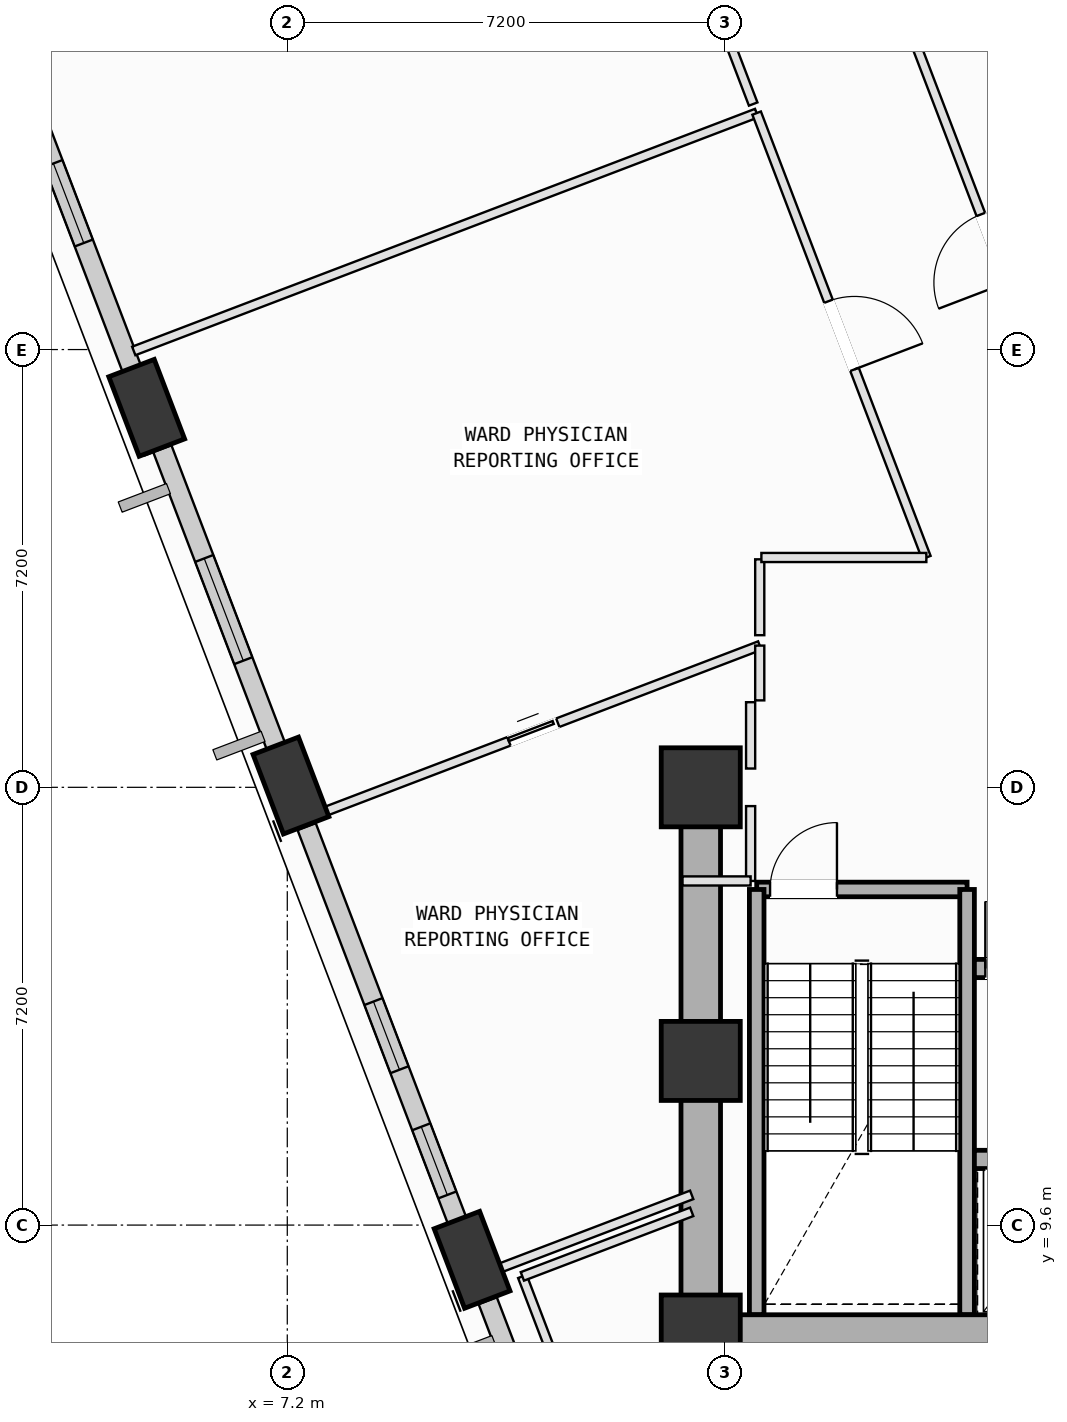
"""IFC4 building model, lengths in metres.
Left out: names, types, materials, properties, quantities, classifications, styles, units other than length and angle.
Written with IfcOpenShell. Run it as: python <this file> out.ifc"""

import sys

from ifc_helpers import new_model, si_unit, direction, frame, frame_2d, origin, origin_2d, place, context, subcontext, project, spatial, rectangle, extrude, element, fill, save


model = new_model("IFC4")
c1 = context("Model", 3, precision=1e-05, world=origin(), true_north=direction((0.0, 1.0)))
c2 = subcontext(c1, "Body", "Model", "MODEL_VIEW")
j1 = project(units=[si_unit("LENGTHUNIT", "METRE"), si_unit("PLANEANGLEUNIT", "RADIAN")], contexts=[c1])
p1 = place(None, origin())
s1 = spatial("IfcSite", under=j1, at=p1, CompositionType="ELEMENT")
p2 = place(p1, origin())
s2 = spatial("IfcBuilding", under=s1, at=p2, CompositionType="ELEMENT")
p3 = place(p2, frame((0.0, 0.0, 112.4)))
s3 = spatial("IfcBuildingStorey", under=s2, at=p3, CompositionType="ELEMENT", Elevation=112.4)
for number, where, z_axis, x_axis in (
    (1, (14.0, 7.8, 0.0), (0.0, 0.0, 1.0), (1.0, 0.0, 0.0)),
    (2, (14.0, 12.3, 0.0), (0.0, 0.0, 1.0), (1.0, 0.0, 0.0)),
    (3, (14.0, 16.8, 0.0), (0.0, 0.0, 1.0), (1.0, 0.0, 0.0)),
):
    element("IfcColumn", number, at=place(p3, frame(where, z_axis=z_axis, x_axis=x_axis)), inside=s3, PredefinedType="COLUMN", context=c2, shape_type="SweptSolid", body=[
        extrude(rectangle(XDim=1.3, YDim=1.3, at=origin_2d()), origin(), (0.0, 0.0, 1.0), 4.0),
    ])
p4 = place(p3, frame((4.888, 23.042, 0.002), z_axis=(0.008189293553, -0.118107811468, 0.992967008687), x_axis=(-0.420049262913, 0.900736291816, 0.110601760074)))
e4 = element("IfcColumn", 4, at=p4, inside=s3, PredefinedType="COLUMN", context=c2, shape_type="SweptSolid", body=[
    extrude(rectangle(XDim=1.4, YDim=0.8, at=origin_2d()), origin(), (0.0, 0.0, 1.0), 4.025),
])
p5 = place(p3, frame((7.26, 16.829, 0.002), z_axis=(0.033747682875, -0.108223234831, 0.99355363486), x_axis=(-0.616879645364, 0.77989986195, 0.105904241962)))
e5 = element("IfcColumn", 5, at=p5, inside=s3, PredefinedType="COLUMN", context=c2, shape_type="SweptSolid", body=[
    extrude(rectangle(XDim=1.4, YDim=0.8, at=origin_2d()), origin(), (0.0, 0.0, 1.0), 4.022),
])
p6 = place(p3, frame((10.239, 9.029, 0.002), z_axis=(0.065774792344, -0.095688973733, 0.993235771103), x_axis=(-0.819595414556, 0.562580206894, 0.108475191866)))
e6 = element("IfcColumn", 6, at=p6, inside=s3, PredefinedType="COLUMN", context=c2, shape_type="SweptSolid", body=[
    extrude(rectangle(XDim=1.4, YDim=0.8, at=origin_2d()), origin(), (0.0, 0.0, 1.0), 4.023),
])
p7 = place(p3, frame((4.794, 23.288, 0.0), z_axis=(0.0, 0.0, 1.0), x_axis=(-0.356736674648, 0.934204980163, 0.0)))
e7 = element("IfcWall", 7, at=p7, inside=s3, PredefinedType="SOLIDWALL", context=c2, shape_type="SweptSolid", body=[
    extrude(rectangle(XDim=5.628, YDim=0.32, at=frame_2d((2.814, 0.0))), origin(), (0.0, 0.0, 1.0), 3.165),
])
p8 = place(p7, frame((2.638, 0.0, 0.75)))
e8 = element("IfcOpeningElement", 8, at=p8, cuts=e7, PredefinedType="OPENING", context=c2, shape_type="SweptSolid", body=[
    extrude(rectangle(XDim=1.4, YDim=1.85, at=frame_2d((0.7, 0.925))), frame((0.0, 0.17, 0.0), z_axis=(0.0, -1.0, 0.0), x_axis=(1.0, 0.0, 0.0)), (0.0, 0.0, 1.0), 0.34),
])
p9 = place(p3, frame((7.165, 17.08, 0.0), z_axis=(0.0, 0.0, 1.0), x_axis=(-0.356759039151, 0.934196439719, 0.0)))
e9 = element("IfcWall", 9, at=p9, inside=s3, PredefinedType="SOLIDWALL", context=c2, shape_type="SweptSolid", body=[
    extrude(rectangle(XDim=5.662, YDim=0.32, at=frame_2d((2.831, 0.0))), origin(), (0.0, 0.0, 1.0), 3.165),
])
p10 = place(p9, frame((1.93, 0.0, 0.75)))
e10 = element("IfcOpeningElement", 10, at=p10, cuts=e9, PredefinedType="OPENING", context=c2, shape_type="SweptSolid", body=[
    extrude(rectangle(XDim=1.8, YDim=2.05, at=frame_2d((0.9, 1.025))), frame((0.0, 0.17, 0.0), z_axis=(0.0, -1.0, 0.0), x_axis=(1.0, 0.0, 0.0)), (0.0, 0.0, 1.0), 0.34),
])
p11 = place(p3, frame((10.144, 9.277, 0.0), z_axis=(0.0, 0.0, 1.0), x_axis=(-0.356744200201, 0.934202106411, 0.0)))
e11 = element("IfcWall", 11, at=p11, inside=s3, PredefinedType="SOLIDWALL", context=c2, shape_type="SweptSolid", body=[
    extrude(rectangle(XDim=7.36, YDim=0.32, at=frame_2d((3.68, 0.0))), origin(), (0.0, 0.0, 1.0), 3.165),
])
p12 = place(p11, frame((3.081, 0.0, 0.75)))
e12 = element("IfcOpeningElement", 12, at=p12, cuts=e11, PredefinedType="OPENING", context=c2, shape_type="SweptSolid", body=[
    extrude(rectangle(XDim=1.2, YDim=1.75, at=frame_2d((0.6, 0.875))), frame((0.0, 0.17, 0.0), z_axis=(0.0, -1.0, 0.0), x_axis=(1.0, 0.0, 0.0)), (0.0, 0.0, 1.0), 0.34),
])
p13 = place(p11, frame((0.876, 0.0, 0.75)))
e13 = element("IfcOpeningElement", 13, at=p13, cuts=e11, PredefinedType="OPENING", context=c2, shape_type="SweptSolid", body=[
    extrude(rectangle(XDim=1.2, YDim=1.75, at=frame_2d((0.6, 0.875))), frame((0.0, 0.17, 0.0), z_axis=(0.0, -1.0, 0.0), x_axis=(1.0, 0.0, 0.0)), (0.0, 0.0, 1.0), 0.34),
])
p14 = place(p3, frame((12.716, 2.542, 0.0), z_axis=(0.0, 0.0, 1.0), x_axis=(-0.35674887544, 0.934200321062, 0.0)))
e14 = element("IfcWall", 14, at=p14, inside=s3, PredefinedType="SOLIDWALL", context=c2, shape_type="SweptSolid", body=[
    extrude(rectangle(XDim=6.223, YDim=0.32, at=frame_2d((3.112, 0.0))), origin(), (0.0, 0.0, 1.0), 3.165),
])
p15 = place(p14, frame((2.314, 0.0, 0.75)))
e15 = element("IfcOpeningElement", 15, at=p15, cuts=e14, PredefinedType="OPENING", context=c2, shape_type="SweptSolid", body=[
    extrude(rectangle(XDim=1.6, YDim=1.95, at=frame_2d((0.8, 0.975))), frame((0.0, 0.17, 0.0), z_axis=(0.0, -1.0, 0.0), x_axis=(1.0, 0.0, 0.0)), (0.0, 0.0, 1.0), 0.34),
])
p16 = place(p3, frame((14.92, 15.12, 0.0), z_axis=(0.0, 0.0, 1.0), x_axis=(1.0, 0.0, 0.0)))
e16 = element("IfcWall", 16, at=p16, inside=s3, PredefinedType="SOLIDWALL", context=c2, shape_type="SweptSolid", body=[
    extrude(rectangle(XDim=3.46, YDim=0.24, at=frame_2d((1.73, 0.0))), origin(), (0.0, 0.0, 1.0), 3.78),
])
p17 = place(p16, frame((0.22, 0.0, 0.0)))
e17 = element("IfcOpeningElement", 17, at=p17, cuts=e16, PredefinedType="OPENING", context=c2, shape_type="SweptSolid", body=[
    extrude(rectangle(XDim=1.1, YDim=2.15, at=frame_2d((0.55, 1.075))), frame((0.0, 0.13, 0.0), z_axis=(0.0, -1.0, 0.0), x_axis=(1.0, 0.0, 0.0)), (0.0, 0.0, 1.0), 0.26),
])
for number, where, z_axis, x_axis in (
    (18, (18.38, 15.12, 0.0), (0.0, 0.0, 1.0), (0.0, -1.0, 0.0)),
    (19, (14.92, 8.125, 0.0), (0.0, 0.0, 1.0), (0.0, 1.0, 0.0)),
):
    element("IfcWall", number, at=place(p3, frame(where, z_axis=z_axis, x_axis=x_axis)), inside=s3, PredefinedType="SOLIDWALL", context=c2, shape_type="SweptSolid", body=[
        extrude(rectangle(XDim=6.995, YDim=0.24, at=frame_2d((3.498, 0.0))), origin(), (0.0, 0.0, 1.0), 3.78),
    ])
p18 = place(p3, frame((14.0, 7.8, 0.0), z_axis=(0.0, 0.0, 1.0), x_axis=(1.0, 0.0, 0.0)))
e20 = element("IfcWall", 20, at=p18, inside=s3, PredefinedType="SHEAR", context=c2, shape_type="SweptSolid", body=[
    extrude(rectangle(XDim=10.8, YDim=0.65, at=frame_2d((5.4, 0.0))), origin(), (0.0, 0.0, 1.0), 3.78),
])
p19 = place(p3, frame((14.0, 16.8, 0.0), z_axis=(0.0, 0.0, 1.0), x_axis=(0.0, -1.0, 0.0)))
e21 = element("IfcWall", 21, at=p19, inside=s3, PredefinedType="SHEAR", context=c2, shape_type="SweptSolid", body=[
    extrude(rectangle(XDim=9.0, YDim=0.65, at=frame_2d((4.5, 0.0))), origin(), (0.0, 0.0, 1.0), 3.78),
])
p20 = place(p3, frame((18.5, 10.68, 0.0), z_axis=(0.0, 0.0, 1.0), x_axis=(1.0, 0.0, 0.0)))
e22 = element("IfcWall", 22, at=p20, inside=s3, PredefinedType="SOLIDWALL", context=c2, shape_type="SweptSolid", body=[
    extrude(rectangle(XDim=5.3, YDim=0.3, at=frame_2d((2.65, 0.0))), origin(), (0.0, 0.0, 1.0), 3.78),
])
p21 = place(p20, frame((4.22, 0.0, 0.0)))
e23 = element("IfcOpeningElement", 23, at=p21, cuts=e22, PredefinedType="OPENING", context=c2, shape_type="SweptSolid", body=[
    extrude(rectangle(XDim=0.86, YDim=2.06, at=frame_2d((0.43, 1.03))), frame((0.0, 0.16, 0.0), z_axis=(0.0, -1.0, 0.0), x_axis=(1.0, 0.0, 0.0)), (0.0, 0.0, 1.0), 0.32),
])
p22 = place(p20, frame((0.425, 0.0, 0.0)))
e24 = element("IfcOpeningElement", 24, at=p22, cuts=e22, PredefinedType="OPENING", context=c2, shape_type="SweptSolid", body=[
    extrude(rectangle(XDim=1.25, YDim=2.18, at=frame_2d((0.625, 1.09))), frame((0.0, 0.16, 0.0), z_axis=(0.0, -1.0, 0.0), x_axis=(1.0, 0.0, 0.0)), (0.0, 0.0, 1.0), 0.32),
])
p23 = place(p20, frame((2.525, 0.0, 0.0)))
e25 = element("IfcOpeningElement", 25, at=p23, cuts=e22, PredefinedType="OPENING", context=c2, shape_type="SweptSolid", body=[
    extrude(rectangle(XDim=1.25, YDim=2.18, at=frame_2d((0.625, 1.09))), frame((0.0, 0.16, 0.0), z_axis=(0.0, -1.0, 0.0), x_axis=(1.0, 0.0, 0.0)), (0.0, 0.0, 1.0), 0.32),
])
p24 = place(p3, frame((18.5, 13.82, 0.0), z_axis=(0.0, 0.0, 1.0), x_axis=(1.0, 0.0, 0.0)))
e26 = element("IfcWall", 26, at=p24, inside=s3, PredefinedType="SOLIDWALL", context=c2, shape_type="SweptSolid", body=[
    extrude(rectangle(XDim=5.3, YDim=0.3, at=frame_2d((2.65, 0.0))), origin(), (0.0, 0.0, 1.0), 3.78),
])
p25 = place(p24, frame((0.18, 0.0, 0.0)))
e27 = element("IfcOpeningElement", 27, at=p25, cuts=e26, PredefinedType="OPENING", context=c2, shape_type="SweptSolid", body=[
    extrude(rectangle(XDim=1.1, YDim=2.15, at=frame_2d((0.55, 1.075))), frame((0.0, 0.16, 0.0), z_axis=(0.0, -1.0, 0.0), x_axis=(1.0, 0.0, 0.0)), (0.0, 0.0, 1.0), 0.32),
])
p26 = place(p3, frame((15.609, -3.141, 0.0), z_axis=(0.0, 0.0, 1.0), x_axis=(-0.356728640105, 0.934208048204, 0.0)))
e28 = element("IfcWall", 28, at=p26, inside=s3, PredefinedType="PARTITIONING", context=c2, shape_type="SweptSolid", body=[
    extrude(rectangle(XDim=12.735, YDim=0.15, at=frame_2d((6.368, 0.0))), origin(), (0.0, 0.0, 1.0), 2.965),
])
p27 = place(p3, frame((11.066, 8.756, 0.0), z_axis=(0.0, 0.0, 1.0), x_axis=(0.934376103135, 0.356288223057, 0.0)))
e29 = element("IfcWall", 29, at=p27, inside=s3, PredefinedType="PARTITIONING", context=c2, shape_type="SweptSolid", body=[
    extrude(rectangle(XDim=2.981, YDim=0.15, at=frame_2d((1.49, 0.0))), origin(), (0.0, 0.0, 1.0), 3.78),
])
p28 = place(p3, frame((14.82, 18.2, 0.0), z_axis=(0.0, 0.0, 1.0), x_axis=(0.0, -1.0, 0.0)))
e30 = element("IfcWall", 30, at=p28, inside=s3, PredefinedType="PARTITIONING", context=c2, shape_type="SweptSolid", body=[
    extrude(rectangle(XDim=1.091, YDim=0.15, at=frame_2d((0.545, 0.0))), origin(), (0.0, 0.0, 1.0), 3.78),
])
p29 = place(p3, frame((14.82, 16.491, 0.0), z_axis=(0.0, 0.0, 1.0), x_axis=(0.0, -1.0, 0.0)))
e31 = element("IfcWall", 31, at=p29, inside=s3, PredefinedType="PARTITIONING", context=c2, shape_type="SweptSolid", body=[
    extrude(rectangle(XDim=1.231, YDim=0.15, at=frame_2d((0.615, 0.0))), origin(), (0.0, 0.0, 1.0), 3.78),
])
p30 = place(p3, frame((14.82, 15.26, 0.0), z_axis=(0.0, 0.0, 1.0), x_axis=(-1.0, 0.0, 0.0)))
e32 = element("IfcWall", 32, at=p30, inside=s3, PredefinedType="PARTITIONING", context=c2, shape_type="SweptSolid", body=[
    extrude(rectangle(XDim=1.12, YDim=0.15, at=frame_2d((0.56, 0.0))), origin(), (0.0, 0.0, 1.0), 3.78),
])
p31 = place(p3, frame((13.851, 10.097, 0.0), z_axis=(0.0, 0.0, 1.0), x_axis=(-0.934274053159, -0.356555737009, 0.0)))
e33 = element("IfcWall", 33, at=p31, inside=s3, PredefinedType="PARTITIONING", context=c2, shape_type="SweptSolid", body=[
    extrude(rectangle(XDim=3.985, YDim=0.15, at=frame_2d((1.993, 0.0))), origin(), (0.0, 0.0, 1.0), 3.78),
])
p32 = place(p3, frame((10.128, 8.676, 0.0), z_axis=(0.0, 0.0, 1.0), x_axis=(-0.356415622783, 0.934327514224, 0.0)))
e34 = element("IfcWall", 34, at=p32, inside=s3, PredefinedType="PARTITIONING", context=c2, shape_type="SweptSolid", body=[
    extrude(rectangle(XDim=0.555, YDim=0.15, at=frame_2d((0.278, 0.0))), origin(), (0.0, 0.0, 1.0), 3.165),
])
p33 = place(p3, frame((7.524, 16.288, 0.0), z_axis=(0.0, 0.0, 1.0), x_axis=(0.934219128536, 0.356699621358, 0.0)))
e35 = element("IfcWall", 35, at=p33, inside=s3, PredefinedType="PARTITIONING", context=c2, shape_type="SweptSolid", body=[
    extrude(rectangle(XDim=7.97, YDim=0.15, at=frame_2d((3.985, 0.0))), origin(), (0.0, 0.0, 1.0), 3.78),
])
p34 = place(p33, frame((3.555, 0.0, 0.0)))
e36 = element("IfcOpeningElement", 36, at=p34, cuts=e35, PredefinedType="OPENING", context=c2, shape_type="SweptSolid", body=[
    extrude(rectangle(XDim=0.86, YDim=2.06, at=frame_2d((0.43, 1.03))), frame((0.0, 0.085, 0.0), z_axis=(0.0, -1.0, 0.0), x_axis=(1.0, 0.0, 0.0)), (0.0, 0.0, 1.0), 0.17),
])
p35 = place(p3, frame((14.97, 19.131, 0.0), z_axis=(0.0, 0.0, 1.0), x_axis=(0.0, -1.0, 0.0)))
e37 = element("IfcWall", 37, at=p35, inside=s3, PredefinedType="PARTITIONING", context=c2, shape_type="SweptSolid", body=[
    extrude(rectangle(XDim=0.901, YDim=0.15, at=frame_2d((0.451, 0.0))), origin(), (0.0, 0.0, 1.0), 3.78),
])
p36 = place(p3, frame((14.97, 20.55, 0.0), z_axis=(0.0, 0.0, 1.0), x_axis=(0.0, -1.0, 0.0)))
e38 = element("IfcWall", 38, at=p36, inside=s3, PredefinedType="PARTITIONING", context=c2, shape_type="SweptSolid", body=[
    extrude(rectangle(XDim=1.248, YDim=0.15, at=frame_2d((0.624, 0.0))), origin(), (0.0, 0.0, 1.0), 3.78),
])
p37 = place(p3, frame((7.203, 16.336, 0.0), z_axis=(0.0, 0.0, 1.0), x_axis=(-0.356854607456, 0.934159937665, 0.0)))
e39 = element("IfcWall", 39, at=p37, inside=s3, PredefinedType="PARTITIONING", context=c2, shape_type="SweptSolid", body=[
    extrude(rectangle(XDim=0.709, YDim=0.15, at=frame_2d((0.354, 0.0))), origin(), (0.0, 0.0, 1.0), 3.165),
])
p38 = place(p3, frame((4.93, 22.287, 0.0), z_axis=(0.0, 0.0, 1.0), x_axis=(-0.356997215176, 0.9341054482, 0.0)))
e40 = element("IfcWall", 40, at=p38, inside=s3, PredefinedType="PARTITIONING", context=c2, shape_type="SweptSolid", body=[
    extrude(rectangle(XDim=0.983, YDim=0.15, at=frame_2d((0.491, 0.0))), origin(), (0.0, 0.0, 1.0), 3.165),
])
p39 = place(p3, frame((4.675, 23.977, 0.0), z_axis=(0.0, 0.0, 1.0), x_axis=(0.934201387947, 0.356746081629, 0.0)))
e41 = element("IfcWall", 41, at=p39, inside=s3, PredefinedType="PARTITIONING", context=c2, shape_type="SweptSolid", body=[
    extrude(rectangle(XDim=10.965, YDim=0.15, at=frame_2d((5.483, 0.0))), origin(), (0.0, 0.0, 1.0), 3.78),
])
p40 = place(p3, frame((14.919, 27.889, 0.0), z_axis=(0.0, 0.0, 1.0), x_axis=(0.356742665593, -0.934202692431, 0.0)))
e42 = element("IfcWall", 42, at=p40, inside=s3, PredefinedType="PARTITIONING", context=c2, shape_type="SweptSolid", body=[
    extrude(rectangle(XDim=7.824, YDim=0.15, at=frame_2d((3.912, 0.0))), origin(), (0.0, 0.0, 1.0), 3.78),
])
p41 = place(p40, frame((3.312, 0.0, 0.0)))
e43 = element("IfcOpeningElement", 43, at=p41, cuts=e42, PredefinedType="OPENING", context=c2, shape_type="SweptSolid", body=[
    extrude(rectangle(XDim=1.2, YDim=2.15, at=frame_2d((0.6, 1.075))), frame((0.0, 0.085, 0.0), z_axis=(0.0, -1.0, 0.0), x_axis=(1.0, 0.0, 0.0)), (0.0, 0.0, 1.0), 0.17),
])
p42 = place(p3, frame((17.71, 20.58, 0.0), z_axis=(0.0, 0.0, 1.0), x_axis=(-1.0, 0.0, 0.0)))
e44 = element("IfcWall", 44, at=p42, inside=s3, PredefinedType="PARTITIONING", context=c2, shape_type="SweptSolid", body=[
    extrude(rectangle(XDim=2.713, YDim=0.15, at=frame_2d((1.356, 0.0))), origin(), (0.0, 0.0, 1.0), 3.78),
])
p43 = place(p3, frame((11.994, 35.549, 0.0), z_axis=(0.0, 0.0, 1.0), x_axis=(0.356737704726, -0.934204586815, 0.0)))
e45 = element("IfcWall", 45, at=p43, inside=s3, PredefinedType="PARTITIONING", context=c2, shape_type="SweptSolid", body=[
    extrude(rectangle(XDim=8.04, YDim=0.15, at=frame_2d((4.02, 0.0))), origin(), (0.0, 0.0, 1.0), 3.78),
])
p44 = place(p43, frame((3.42, 0.0, 0.0)))
e46 = element("IfcOpeningElement", 46, at=p44, cuts=e45, PredefinedType="OPENING", context=c2, shape_type="SweptSolid", body=[
    extrude(rectangle(XDim=1.2, YDim=2.15, at=frame_2d((0.6, 1.075))), frame((0.0, 0.085, 0.0), z_axis=(0.0, -1.0, 0.0), x_axis=(1.0, 0.0, 0.0)), (0.0, 0.0, 1.0), 0.17),
])
p45 = place(p3, frame((20.182, 22.095, 0.0), z_axis=(0.0, 0.0, 1.0), x_axis=(-0.356741141549, 0.934203274414, 0.0)))
e47 = element("IfcWall", 47, at=p45, inside=s3, PredefinedType="PARTITIONING", context=c2, shape_type="SweptSolid", body=[
    extrude(rectangle(XDim=7.635, YDim=0.15, at=frame_2d((3.818, 0.0))), origin(), (0.0, 0.0, 1.0), 3.78),
])
p46 = place(p45, frame((3.218, 0.0, 0.0)))
e48 = element("IfcOpeningElement", 48, at=p46, cuts=e47, PredefinedType="OPENING", context=c2, shape_type="SweptSolid", body=[
    extrude(rectangle(XDim=1.2, YDim=2.15, at=frame_2d((0.6, 1.075))), frame((0.0, 0.085, 0.0), z_axis=(0.0, -1.0, 0.0), x_axis=(1.0, 0.0, 0.0)), (0.0, 0.0, 1.0), 0.17),
])
p47 = place(p8, origin())
e49 = element("IfcWindow", 49, at=p47, inside=s3, PartitioningType="SINGLE_PANEL", PredefinedType="WINDOW", context=c2, shape_type="SweptSolid", body=[
    extrude(rectangle(XDim=1.4, YDim=1.85, at=frame_2d((0.7, 0.925))), frame((0.0, 0.03, 0.0), z_axis=(0.0, -1.0, 0.0), x_axis=(1.0, 0.0, 0.0)), (0.0, 0.0, 1.0), 0.06),
])
fill(e8, e49)
p48 = place(p10, origin())
e50 = element("IfcWindow", 50, at=p48, inside=s3, PartitioningType="SINGLE_PANEL", PredefinedType="WINDOW", context=c2, shape_type="SweptSolid", body=[
    extrude(rectangle(XDim=1.8, YDim=2.05, at=frame_2d((0.9, 1.025))), frame((0.0, 0.03, 0.0), z_axis=(0.0, -1.0, 0.0), x_axis=(1.0, 0.0, 0.0)), (0.0, 0.0, 1.0), 0.06),
])
fill(e10, e50)
p49 = place(p12, origin())
e51 = element("IfcWindow", 51, at=p49, inside=s3, PartitioningType="SINGLE_PANEL", PredefinedType="WINDOW", context=c2, shape_type="SweptSolid", body=[
    extrude(rectangle(XDim=1.2, YDim=1.75, at=frame_2d((0.6, 0.875))), frame((0.0, 0.03, 0.0), z_axis=(0.0, -1.0, 0.0), x_axis=(1.0, 0.0, 0.0)), (0.0, 0.0, 1.0), 0.06),
])
fill(e12, e51)
p50 = place(p13, origin())
e52 = element("IfcWindow", 52, at=p50, inside=s3, PartitioningType="SINGLE_PANEL", PredefinedType="WINDOW", context=c2, shape_type="SweptSolid", body=[
    extrude(rectangle(XDim=1.2, YDim=1.75, at=frame_2d((0.6, 0.875))), frame((0.0, 0.03, 0.0), z_axis=(0.0, -1.0, 0.0), x_axis=(1.0, 0.0, 0.0)), (0.0, 0.0, 1.0), 0.06),
])
fill(e13, e52)
p51 = place(p17, origin())
e53 = element("IfcDoor", 53, at=p51, inside=s3, OperationType="SINGLE_SWING_RIGHT", PredefinedType="DOOR", context=c2, shape_type="SweptSolid", body=[
    extrude(rectangle(XDim=1.1, YDim=2.15, at=frame_2d((0.55, 1.075))), frame((0.0, 0.025, 0.0), z_axis=(0.0, -1.0, 0.0), x_axis=(1.0, 0.0, 0.0)), (0.0, 0.0, 1.0), 0.05),
])
fill(e17, e53)
p52 = place(p25, origin())
e54 = element("IfcDoor", 54, at=p52, inside=s3, OperationType="SINGLE_SWING_LEFT", PredefinedType="DOOR", context=c2, shape_type="SweptSolid", body=[
    extrude(rectangle(XDim=1.1, YDim=2.15, at=frame_2d((0.55, 1.075))), frame((0.0, 0.025, 0.0), z_axis=(0.0, -1.0, 0.0), x_axis=(1.0, 0.0, 0.0)), (0.0, 0.0, 1.0), 0.05),
])
fill(e27, e54)
p53 = place(p41, origin())
e55 = element("IfcDoor", 55, at=p53, inside=s3, OperationType="SINGLE_SWING_RIGHT", PredefinedType="DOOR", context=c2, shape_type="SweptSolid", body=[
    extrude(rectangle(XDim=1.2, YDim=2.15, at=frame_2d((0.6, 1.075))), frame((0.0, 0.025, 0.0), z_axis=(0.0, -1.0, 0.0), x_axis=(1.0, 0.0, 0.0)), (0.0, 0.0, 1.0), 0.05),
])
fill(e43, e55)
p54 = place(p46, origin())
e56 = element("IfcDoor", 56, at=p54, inside=s3, OperationType="SINGLE_SWING_LEFT", PredefinedType="DOOR", context=c2, shape_type="SweptSolid", body=[
    extrude(rectangle(XDim=1.2, YDim=2.15, at=frame_2d((0.6, 1.075))), frame((0.0, 0.025, 0.0), z_axis=(0.0, -1.0, 0.0), x_axis=(1.0, 0.0, 0.0)), (0.0, 0.0, 1.0), 0.05),
])
fill(e48, e56)
p55 = place(p34, origin())
e57 = element("IfcDoor", 57, at=p55, inside=s3, OperationType="SLIDING_TO_LEFT", PredefinedType="DOOR", context=c2, shape_type="SweptSolid", body=[
    extrude(rectangle(XDim=0.86, YDim=2.06, at=frame_2d((0.43, 1.03))), frame((0.0, 0.025, 0.0), z_axis=(0.0, -1.0, 0.0), x_axis=(1.0, 0.0, 0.0)), (0.0, 0.0, 1.0), 0.05),
])
fill(e36, e57)
save(model, sys.argv[1])
